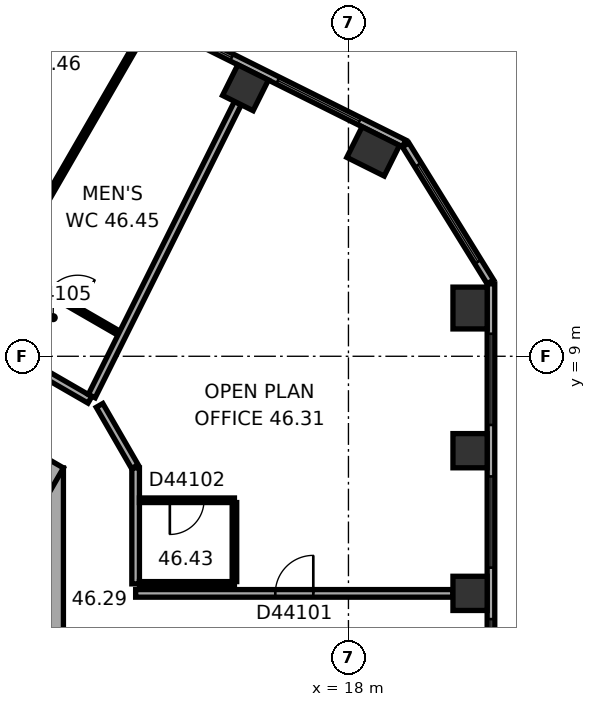
"""IFC4 building model, lengths in metres.
Left out: names, types, materials, properties, quantities, classifications, styles, units other than length and angle.
Written with IfcOpenShell. Run it as: python <this file> out.ifc"""

import sys

from ifc_helpers import new_model, si_unit, direction, frame, frame_2d, origin, origin_2d, place, context, subcontext, project, spatial, rectangle, extrude, element, fill, save


model = new_model("IFC4")
c1 = context("Model", 3, precision=1e-05, world=origin(), true_north=direction((0.0, 1.0)))
c2 = subcontext(c1, "Body", "Model", "MODEL_VIEW")
j1 = project(units=[si_unit("LENGTHUNIT", "METRE"), si_unit("PLANEANGLEUNIT", "RADIAN")], contexts=[c1])
p1 = place(None, origin())
s1 = spatial("IfcSite", under=j1, at=p1, CompositionType="ELEMENT")
p2 = place(p1, origin())
s2 = spatial("IfcBuilding", under=s1, at=p2, CompositionType="ELEMENT")
p3 = place(p2, frame((0.0, 0.0, 187.3)))
s3 = spatial("IfcBuildingStorey", under=s2, at=p3, CompositionType="ELEMENT", Elevation=187.3)
for number, where, z_axis, x_axis in (
    (1, (21.2, 2.761, 0.0), (0.0, 0.0, 1.0), (0.0, 1.0, 0.0)),
    (2, (21.2, 6.515, 0.0), (0.0, 0.0, 1.0), (0.0, 1.0, 0.0)),
):
    element("IfcColumn", number, at=place(p3, frame(where, z_axis=z_axis, x_axis=x_axis)), inside=s3, PredefinedType="COLUMN", context=c2, shape_type="SweptSolid", body=[
        extrude(rectangle(XDim=0.9, YDim=0.9, at=origin_2d()), origin(), (0.0, 0.0, 1.0), 3.7),
    ])
for number, where, z_axis, x_axis in (
    (3, (21.2, 10.27, 0.0), (0.0, 0.0, 1.0), (0.0, 1.0, 0.0)),
    (4, (18.65, 14.39, 0.0), (0.0, 0.0, 1.0), (-0.895, 0.446, 0.0)),
):
    element("IfcColumn", number, at=place(p3, frame(where, z_axis=z_axis, x_axis=x_axis)), inside=s3, PredefinedType="COLUMN", context=c2, shape_type="SweptSolid", body=[
        extrude(rectangle(XDim=1.1, YDim=0.9, at=origin_2d()), origin(), (0.0, 0.0, 1.0), 3.7),
    ])
p4 = place(p3, frame((15.29, 16.065, 0.0), z_axis=(0.0, 0.0, 1.0), x_axis=(-0.894934361602, 0.44619781311, 0.0)))
e5 = element("IfcColumn", 5, at=p4, inside=s3, PredefinedType="COLUMN", context=c2, shape_type="SweptSolid", body=[
    extrude(rectangle(XDim=0.9, YDim=0.9, at=origin_2d()), origin(), (0.0, 0.0, 1.0), 3.7),
])
p5 = place(p3, frame((10.0, -6.062, 0.0), z_axis=(0.0, 0.0, 1.0), x_axis=(0.0, 1.0, 0.0)))
e6 = element("IfcWall", 6, at=p5, inside=s3, PredefinedType="SHEAR", context=c2, shape_type="SweptSolid", body=[
    extrude(rectangle(XDim=12.125, YDim=1.0, at=frame_2d((6.062, 0.0))), origin(), (0.0, 0.0, 1.0), 3.7),
])
p6 = place(p5, frame((6.262, 0.0, 0.0)))
e7 = element("IfcOpeningElement", 7, at=p6, cuts=e6, PredefinedType="OPENING", context=c2, shape_type="SweptSolid", body=[
    extrude(rectangle(XDim=1.5, YDim=2.1, at=frame_2d((0.75, 1.05))), frame((0.0, 0.51, 0.0), z_axis=(0.0, -1.0, 0.0), x_axis=(1.0, 0.0, 0.0)), (0.0, 0.0, 1.0), 1.02),
])
p7 = place(p5, frame((3.112, 0.0, 0.0)))
e8 = element("IfcOpeningElement", 8, at=p7, cuts=e6, PredefinedType="OPENING", context=c2, shape_type="SweptSolid", body=[
    extrude(rectangle(XDim=0.9, YDim=2.1, at=frame_2d((0.45, 1.05))), frame((0.0, 0.51, 0.0), z_axis=(0.0, -1.0, 0.0), x_axis=(1.0, 0.0, 0.0)), (0.0, 0.0, 1.0), 1.02),
])
p8 = place(p3, frame((10.25, 5.629, 0.0), z_axis=(0.0, 0.0, 1.0), x_axis=(-0.866022616891, 0.50000482701, 0.0)))
e9 = element("IfcWall", 9, at=p8, inside=s3, PredefinedType="SHEAR", context=c2, shape_type="SweptSolid", body=[
    extrude(rectangle(XDim=12.125, YDim=1.0, at=frame_2d((6.062, 0.0))), origin(), (0.0, 0.0, 1.0), 3.7),
])
p9 = place(p8, frame((5.312, 0.0, 0.0)))
e10 = element("IfcOpeningElement", 10, at=p9, cuts=e9, PredefinedType="OPENING", context=c2, shape_type="SweptSolid", body=[
    extrude(rectangle(XDim=0.9, YDim=2.1, at=frame_2d((0.45, 1.05))), frame((0.0, 0.51, 0.0), z_axis=(0.0, -1.0, 0.0), x_axis=(1.0, 0.0, 0.0)), (0.0, 0.0, 1.0), 1.02),
])
p10 = place(p3, frame((21.75, -9.138, 0.0), z_axis=(0.0, 0.0, 1.0), x_axis=(0.0, 1.0, 0.0)))
e11 = element("IfcWall", 11, at=p10, inside=s3, PredefinedType="STANDARD", context=c2, shape_type="SweptSolid", body=[
    extrude(rectangle(XDim=20.044, YDim=0.2, at=frame_2d((10.022, 0.0))), origin(), (0.0, 0.0, 1.0), 3.7),
])
p11 = place(p10, frame((1.314, 0.0, 0.9)))
e12 = element("IfcOpeningElement", 12, at=p11, cuts=e11, PredefinedType="OPENING", context=c2, shape_type="SweptSolid", body=[
    extrude(rectangle(XDim=2.4, YDim=2.0, at=frame_2d((1.2, 1.0))), frame((0.0, 0.11, 0.0), z_axis=(0.0, -1.0, 0.0), x_axis=(1.0, 0.0, 0.0)), (0.0, 0.0, 1.0), 0.22),
])
p12 = place(p10, frame((5.069, 0.0, 0.9)))
e13 = element("IfcOpeningElement", 13, at=p12, cuts=e11, PredefinedType="OPENING", context=c2, shape_type="SweptSolid", body=[
    extrude(rectangle(XDim=2.4, YDim=2.0, at=frame_2d((1.2, 1.0))), frame((0.0, 0.11, 0.0), z_axis=(0.0, -1.0, 0.0), x_axis=(1.0, 0.0, 0.0)), (0.0, 0.0, 1.0), 0.22),
])
p13 = place(p10, frame((8.823, 0.0, 0.9)))
e14 = element("IfcOpeningElement", 14, at=p13, cuts=e11, PredefinedType="OPENING", context=c2, shape_type="SweptSolid", body=[
    extrude(rectangle(XDim=2.4, YDim=2.0, at=frame_2d((1.2, 1.0))), frame((0.0, 0.11, 0.0), z_axis=(0.0, -1.0, 0.0), x_axis=(1.0, 0.0, 0.0)), (0.0, 0.0, 1.0), 0.22),
])
p14 = place(p10, frame((12.577, 0.0, 0.9)))
e15 = element("IfcOpeningElement", 15, at=p14, cuts=e11, PredefinedType="OPENING", context=c2, shape_type="SweptSolid", body=[
    extrude(rectangle(XDim=2.4, YDim=2.0, at=frame_2d((1.2, 1.0))), frame((0.0, 0.11, 0.0), z_axis=(0.0, -1.0, 0.0), x_axis=(1.0, 0.0, 0.0)), (0.0, 0.0, 1.0), 0.22),
])
p15 = place(p10, frame((16.331, 0.0, 0.9)))
e16 = element("IfcOpeningElement", 16, at=p15, cuts=e11, PredefinedType="OPENING", context=c2, shape_type="SweptSolid", body=[
    extrude(rectangle(XDim=2.4, YDim=2.0, at=frame_2d((1.2, 1.0))), frame((0.0, 0.11, 0.0), z_axis=(0.0, -1.0, 0.0), x_axis=(1.0, 0.0, 0.0)), (0.0, 0.0, 1.0), 0.22),
])
p16 = place(p3, frame((21.735, 10.958, 0.0), z_axis=(0.0, 0.0, 1.0), x_axis=(-0.526213807775, 0.850352296702, 0.0)))
e17 = element("IfcWall", 17, at=p16, inside=s3, PredefinedType="STANDARD", context=c2, shape_type="SweptSolid", body=[
    extrude(rectangle(XDim=4.238, YDim=0.2, at=frame_2d((2.119, 0.0))), origin(), (0.0, 0.0, 1.0), 3.7),
])
p17 = place(p16, frame((0.619, 0.0, 0.9)))
e18 = element("IfcOpeningElement", 18, at=p17, cuts=e17, PredefinedType="OPENING", context=c2, shape_type="SweptSolid", body=[
    extrude(rectangle(XDim=3.0, YDim=2.0, at=frame_2d((1.5, 1.0))), frame((0.0, 0.11, 0.0), z_axis=(0.0, -1.0, 0.0), x_axis=(1.0, 0.0, 0.0)), (0.0, 0.0, 1.0), 0.22),
])
p18 = place(p3, frame((19.464, 14.599, 0.0), z_axis=(0.0, 0.0, 1.0), x_axis=(-0.894935755043, 0.446195018289, 0.0)))
e19 = element("IfcWall", 19, at=p18, inside=s3, PredefinedType="STANDARD", context=c2, shape_type="SweptSolid", body=[
    extrude(rectangle(XDim=20.044, YDim=0.2, at=frame_2d((10.022, 0.0))), origin(), (0.0, 0.0, 1.0), 3.7),
])
p19 = place(p18, frame((1.313, 0.0, 0.9)))
e20 = element("IfcOpeningElement", 20, at=p19, cuts=e19, PredefinedType="OPENING", context=c2, shape_type="SweptSolid", body=[
    extrude(rectangle(XDim=2.4, YDim=2.0, at=frame_2d((1.2, 1.0))), frame((0.0, 0.11, 0.0), z_axis=(0.0, -1.0, 0.0), x_axis=(1.0, 0.0, 0.0)), (0.0, 0.0, 1.0), 0.22),
])
p20 = place(p18, frame((5.067, 0.0, 0.9)))
e21 = element("IfcOpeningElement", 21, at=p20, cuts=e19, PredefinedType="OPENING", context=c2, shape_type="SweptSolid", body=[
    extrude(rectangle(XDim=2.4, YDim=2.0, at=frame_2d((1.2, 1.0))), frame((0.0, 0.11, 0.0), z_axis=(0.0, -1.0, 0.0), x_axis=(1.0, 0.0, 0.0)), (0.0, 0.0, 1.0), 0.22),
])
p21 = place(p18, frame((8.821, 0.0, 0.9)))
e22 = element("IfcOpeningElement", 22, at=p21, cuts=e19, PredefinedType="OPENING", context=c2, shape_type="SweptSolid", body=[
    extrude(rectangle(XDim=2.4, YDim=2.0, at=frame_2d((1.2, 1.0))), frame((0.0, 0.11, 0.0), z_axis=(0.0, -1.0, 0.0), x_axis=(1.0, 0.0, 0.0)), (0.0, 0.0, 1.0), 0.22),
])
p22 = place(p18, frame((12.575, 0.0, 0.9)))
e23 = element("IfcOpeningElement", 23, at=p22, cuts=e19, PredefinedType="OPENING", context=c2, shape_type="SweptSolid", body=[
    extrude(rectangle(XDim=2.4, YDim=2.0, at=frame_2d((1.2, 1.0))), frame((0.0, 0.11, 0.0), z_axis=(0.0, -1.0, 0.0), x_axis=(1.0, 0.0, 0.0)), (0.0, 0.0, 1.0), 0.22),
])
p23 = place(p18, frame((16.329, 0.0, 0.9)))
e24 = element("IfcOpeningElement", 24, at=p23, cuts=e19, PredefinedType="OPENING", context=c2, shape_type="SweptSolid", body=[
    extrude(rectangle(XDim=2.4, YDim=2.0, at=frame_2d((1.2, 1.0))), frame((0.0, 0.11, 0.0), z_axis=(0.0, -1.0, 0.0), x_axis=(1.0, 0.0, 0.0)), (0.0, 0.0, 1.0), 0.22),
])
p24 = place(p3, frame((11.196, 7.854, 0.0), z_axis=(0.0, 0.0, 1.0), x_axis=(-0.866023877043, 0.500002644385, 0.0)))
e25 = element("IfcWall", 25, at=p24, inside=s3, PredefinedType="PARTITIONING", context=c2, shape_type="SweptSolid", body=[
    extrude(rectangle(XDim=11.792, YDim=0.2, at=frame_2d((5.896, 0.0))), origin(), (0.0, 0.0, 1.0), 3.42),
])
p25 = place(p24, frame((3.261, 0.0, 0.0)))
e26 = element("IfcOpeningElement", 26, at=p25, cuts=e25, PredefinedType="OPENING", context=c2, shape_type="SweptSolid", body=[
    extrude(rectangle(XDim=1.0, YDim=2.1, at=frame_2d((0.5, 1.05))), frame((0.0, 0.11, 0.0), z_axis=(0.0, -1.0, 0.0), x_axis=(1.0, 0.0, 0.0)), (0.0, 0.0, 1.0), 0.22),
])
p26 = place(p3, frame((11.959, 9.608, 0.0), z_axis=(0.0, 0.0, 1.0), x_axis=(-0.866018452427, 0.500012039911, 0.0)))
e27 = element("IfcWall", 27, at=p26, inside=s3, PredefinedType="PARTITIONING", context=c2, shape_type="SweptSolid", body=[
    extrude(rectangle(XDim=7.322, YDim=0.12, at=frame_2d((3.661, 0.0))), origin(), (0.0, 0.0, 1.0), 3.42),
])
p27 = place(p26, frame((5.858, 0.0, 0.0)))
e28 = element("IfcOpeningElement", 28, at=p27, cuts=e27, PredefinedType="OPENING", context=c2, shape_type="SweptSolid", body=[
    extrude(rectangle(XDim=1.0, YDim=2.1, at=frame_2d((0.5, 1.05))), frame((0.0, 0.07, 0.0), z_axis=(0.0, -1.0, 0.0), x_axis=(1.0, 0.0, 0.0)), (0.0, 0.0, 1.0), 0.14),
])
p28 = place(p26, frame((1.25, 0.0, 0.0)))
e29 = element("IfcOpeningElement", 29, at=p28, cuts=e27, PredefinedType="OPENING", context=c2, shape_type="SweptSolid", body=[
    extrude(rectangle(XDim=0.9, YDim=2.1, at=frame_2d((0.45, 1.05))), frame((0.0, 0.07, 0.0), z_axis=(0.0, -1.0, 0.0), x_axis=(1.0, 0.0, 0.0)), (0.0, 0.0, 1.0), 0.14),
])
p29 = place(p26, frame((3.947, 0.0, 0.0)))
e30 = element("IfcOpeningElement", 30, at=p29, cuts=e27, PredefinedType="OPENING", context=c2, shape_type="SweptSolid", body=[
    extrude(rectangle(XDim=0.9, YDim=2.1, at=frame_2d((0.45, 1.05))), frame((0.0, 0.07, 0.0), z_axis=(0.0, -1.0, 0.0), x_axis=(1.0, 0.0, 0.0)), (0.0, 0.0, 1.0), 0.14),
])
p30 = place(p3, frame((12.325, 17.041, 0.0), z_axis=(0.0, 0.0, 1.0), x_axis=(-0.499985538654, -0.866033752885, 0.0)))
e31 = element("IfcWall", 31, at=p30, inside=s3, PredefinedType="PARTITIONING", context=c2, shape_type="SweptSolid", body=[
    extrude(rectangle(XDim=6.56, YDim=0.12, at=frame_2d((3.28, 0.0))), origin(), (0.0, 0.0, 1.0), 3.42),
])
p31 = place(p3, frame((12.38, 6.097, 0.0), z_axis=(0.0, 0.0, 1.0), x_axis=(-0.499964847546, 0.866045698112, 0.0)))
e32 = element("IfcWall", 32, at=p31, inside=s3, PredefinedType="PARTITIONING", context=c2, shape_type="SweptSolid", body=[
    extrude(rectangle(XDim=1.86, YDim=0.2, at=frame_2d((0.93, 0.0))), origin(), (0.0, 0.0, 1.0), 3.42),
])
p32 = place(p3, frame((12.4, 3.011, 0.0), z_axis=(0.0, 0.0, 1.0), x_axis=(0.0, 1.0, 0.0)))
e33 = element("IfcWall", 33, at=p32, inside=s3, PredefinedType="PARTITIONING", context=c2, shape_type="SweptSolid", body=[
    extrude(rectangle(XDim=3.051, YDim=0.2, at=frame_2d((1.525, 0.0))), origin(), (0.0, 0.0, 1.0), 3.42),
])
p33 = place(p3, frame((12.5, 5.211, 0.0), z_axis=(0.0, 0.0, 1.0), x_axis=(1.0, 0.0, 0.0)))
e34 = element("IfcWall", 34, at=p33, inside=s3, PredefinedType="PARTITIONING", context=c2, shape_type="SweptSolid", body=[
    extrude(rectangle(XDim=2.5, YDim=0.12, at=frame_2d((1.25, 0.0))), origin(), (0.0, 0.0, 1.0), 3.42),
])
p34 = place(p33, frame((0.8, 0.0, 0.0)))
e35 = element("IfcOpeningElement", 35, at=p34, cuts=e34, PredefinedType="OPENING", context=c2, shape_type="SweptSolid", body=[
    extrude(rectangle(XDim=0.9, YDim=2.1, at=frame_2d((0.45, 1.05))), frame((0.0, 0.07, 0.0), z_axis=(0.0, -1.0, 0.0), x_axis=(1.0, 0.0, 0.0)), (0.0, 0.0, 1.0), 0.14),
])
p35 = place(p3, frame((15.0, 3.011, 0.0), z_axis=(0.0, 0.0, 1.0), x_axis=(-1.0, 0.0, 0.0)))
e36 = element("IfcWall", 36, at=p35, inside=s3, PredefinedType="PARTITIONING", context=c2, shape_type="SweptSolid", body=[
    extrude(rectangle(XDim=2.5, YDim=0.12, at=frame_2d((1.25, 0.0))), origin(), (0.0, 0.0, 1.0), 3.42),
])
p36 = place(p3, frame((15.0, 5.151, 0.0), z_axis=(0.0, 0.0, 1.0), x_axis=(0.0, -1.0, 0.0)))
e37 = element("IfcWall", 37, at=p36, inside=s3, PredefinedType="PARTITIONING", context=c2, shape_type="SweptSolid", body=[
    extrude(rectangle(XDim=2.08, YDim=0.12, at=frame_2d((1.04, 0.0))), origin(), (0.0, 0.0, 1.0), 3.42),
])
p37 = place(p3, frame((15.09, 15.663, 0.0), z_axis=(0.0, 0.0, 1.0), x_axis=(-0.446204491029, -0.894931032083, 0.0)))
e38 = element("IfcWall", 38, at=p37, inside=s3, PredefinedType="PARTITIONING", context=c2, shape_type="SweptSolid", body=[
    extrude(rectangle(XDim=8.615, YDim=0.2, at=frame_2d((4.308, 0.0))), origin(), (0.0, 0.0, 1.0), 3.42),
])
p38 = place(p3, frame((20.75, 2.761, 0.0), z_axis=(0.0, 0.0, 1.0), x_axis=(-1.0, 0.0, 0.0)))
e39 = element("IfcWall", 39, at=p38, inside=s3, PredefinedType="PARTITIONING", context=c2, shape_type="SweptSolid", body=[
    extrude(rectangle(XDim=8.35, YDim=0.2, at=frame_2d((4.175, 0.0))), origin(), (0.0, 0.0, 1.0), 3.42),
])
p39 = place(p38, frame((3.675, 0.0, 0.0)))
e40 = element("IfcOpeningElement", 40, at=p39, cuts=e39, PredefinedType="OPENING", context=c2, shape_type="SweptSolid", body=[
    extrude(rectangle(XDim=1.0, YDim=2.1, at=frame_2d((0.5, 1.05))), frame((0.0, 0.11, 0.0), z_axis=(0.0, -1.0, 0.0), x_axis=(1.0, 0.0, 0.0)), (0.0, 0.0, 1.0), 0.22),
])
p40 = place(p13, origin())
e41 = element("IfcWindow", 41, at=p40, inside=s3, PartitioningType="SINGLE_PANEL", PredefinedType="WINDOW", context=c2, shape_type="SweptSolid", body=[
    extrude(rectangle(XDim=2.4, YDim=2.0, at=frame_2d((1.2, 1.0))), frame((0.0, 0.03, 0.0), z_axis=(0.0, -1.0, 0.0), x_axis=(1.0, 0.0, 0.0)), (0.0, 0.0, 1.0), 0.06),
])
fill(e14, e41)
p41 = place(p14, origin())
e42 = element("IfcWindow", 42, at=p41, inside=s3, PartitioningType="SINGLE_PANEL", PredefinedType="WINDOW", context=c2, shape_type="SweptSolid", body=[
    extrude(rectangle(XDim=2.4, YDim=2.0, at=frame_2d((1.2, 1.0))), frame((0.0, 0.03, 0.0), z_axis=(0.0, -1.0, 0.0), x_axis=(1.0, 0.0, 0.0)), (0.0, 0.0, 1.0), 0.06),
])
fill(e15, e42)
p42 = place(p15, origin())
e43 = element("IfcWindow", 43, at=p42, inside=s3, PartitioningType="SINGLE_PANEL", PredefinedType="WINDOW", context=c2, shape_type="SweptSolid", body=[
    extrude(rectangle(XDim=2.4, YDim=2.0, at=frame_2d((1.2, 1.0))), frame((0.0, 0.03, 0.0), z_axis=(0.0, -1.0, 0.0), x_axis=(1.0, 0.0, 0.0)), (0.0, 0.0, 1.0), 0.06),
])
fill(e16, e43)
p43 = place(p17, origin())
e44 = element("IfcWindow", 44, at=p43, inside=s3, PartitioningType="SINGLE_PANEL", PredefinedType="WINDOW", context=c2, shape_type="SweptSolid", body=[
    extrude(rectangle(XDim=3.0, YDim=2.0, at=frame_2d((1.5, 1.0))), frame((0.0, 0.03, 0.0), z_axis=(0.0, -1.0, 0.0), x_axis=(1.0, 0.0, 0.0)), (0.0, 0.0, 1.0), 0.06),
])
fill(e18, e44)
p44 = place(p19, origin())
e45 = element("IfcWindow", 45, at=p44, inside=s3, PartitioningType="SINGLE_PANEL", PredefinedType="WINDOW", context=c2, shape_type="SweptSolid", body=[
    extrude(rectangle(XDim=2.4, YDim=2.0, at=frame_2d((1.2, 1.0))), frame((0.0, 0.03, 0.0), z_axis=(0.0, -1.0, 0.0), x_axis=(1.0, 0.0, 0.0)), (0.0, 0.0, 1.0), 0.06),
])
fill(e20, e45)
p45 = place(p20, origin())
e46 = element("IfcWindow", 46, at=p45, inside=s3, PartitioningType="SINGLE_PANEL", PredefinedType="WINDOW", context=c2, shape_type="SweptSolid", body=[
    extrude(rectangle(XDim=2.4, YDim=2.0, at=frame_2d((1.2, 1.0))), frame((0.0, 0.03, 0.0), z_axis=(0.0, -1.0, 0.0), x_axis=(1.0, 0.0, 0.0)), (0.0, 0.0, 1.0), 0.06),
])
fill(e21, e46)
p46 = place(p39, origin())
e47 = element("IfcDoor", 47, at=p46, inside=s3, OperationType="SINGLE_SWING_LEFT", PredefinedType="DOOR", context=c2, shape_type="SweptSolid", body=[
    extrude(rectangle(XDim=1.0, YDim=2.1, at=frame_2d((0.5, 1.05))), frame((0.0, 0.025, 0.0), z_axis=(0.0, -1.0, 0.0), x_axis=(1.0, 0.0, 0.0)), (0.0, 0.0, 1.0), 0.05),
])
fill(e40, e47)
p47 = place(p34, origin())
e48 = element("IfcDoor", 48, at=p47, inside=s3, OperationType="SINGLE_SWING_LEFT", PredefinedType="DOOR", context=c2, shape_type="SweptSolid", body=[
    extrude(rectangle(XDim=0.9, YDim=2.1, at=frame_2d((0.45, 1.05))), frame((0.0, 0.025, 0.0), z_axis=(0.0, -1.0, 0.0), x_axis=(1.0, 0.0, 0.0)), (0.0, 0.0, 1.0), 0.05),
])
fill(e35, e48)
p48 = place(p28, origin())
e49 = element("IfcDoor", 49, at=p48, inside=s3, OperationType="SINGLE_SWING_LEFT", PredefinedType="DOOR", context=c2, shape_type="SweptSolid", body=[
    extrude(rectangle(XDim=0.9, YDim=2.1, at=frame_2d((0.45, 1.05))), frame((0.0, 0.025, 0.0), z_axis=(0.0, -1.0, 0.0), x_axis=(1.0, 0.0, 0.0)), (0.0, 0.0, 1.0), 0.05),
])
fill(e29, e49)
save(model, sys.argv[1])
